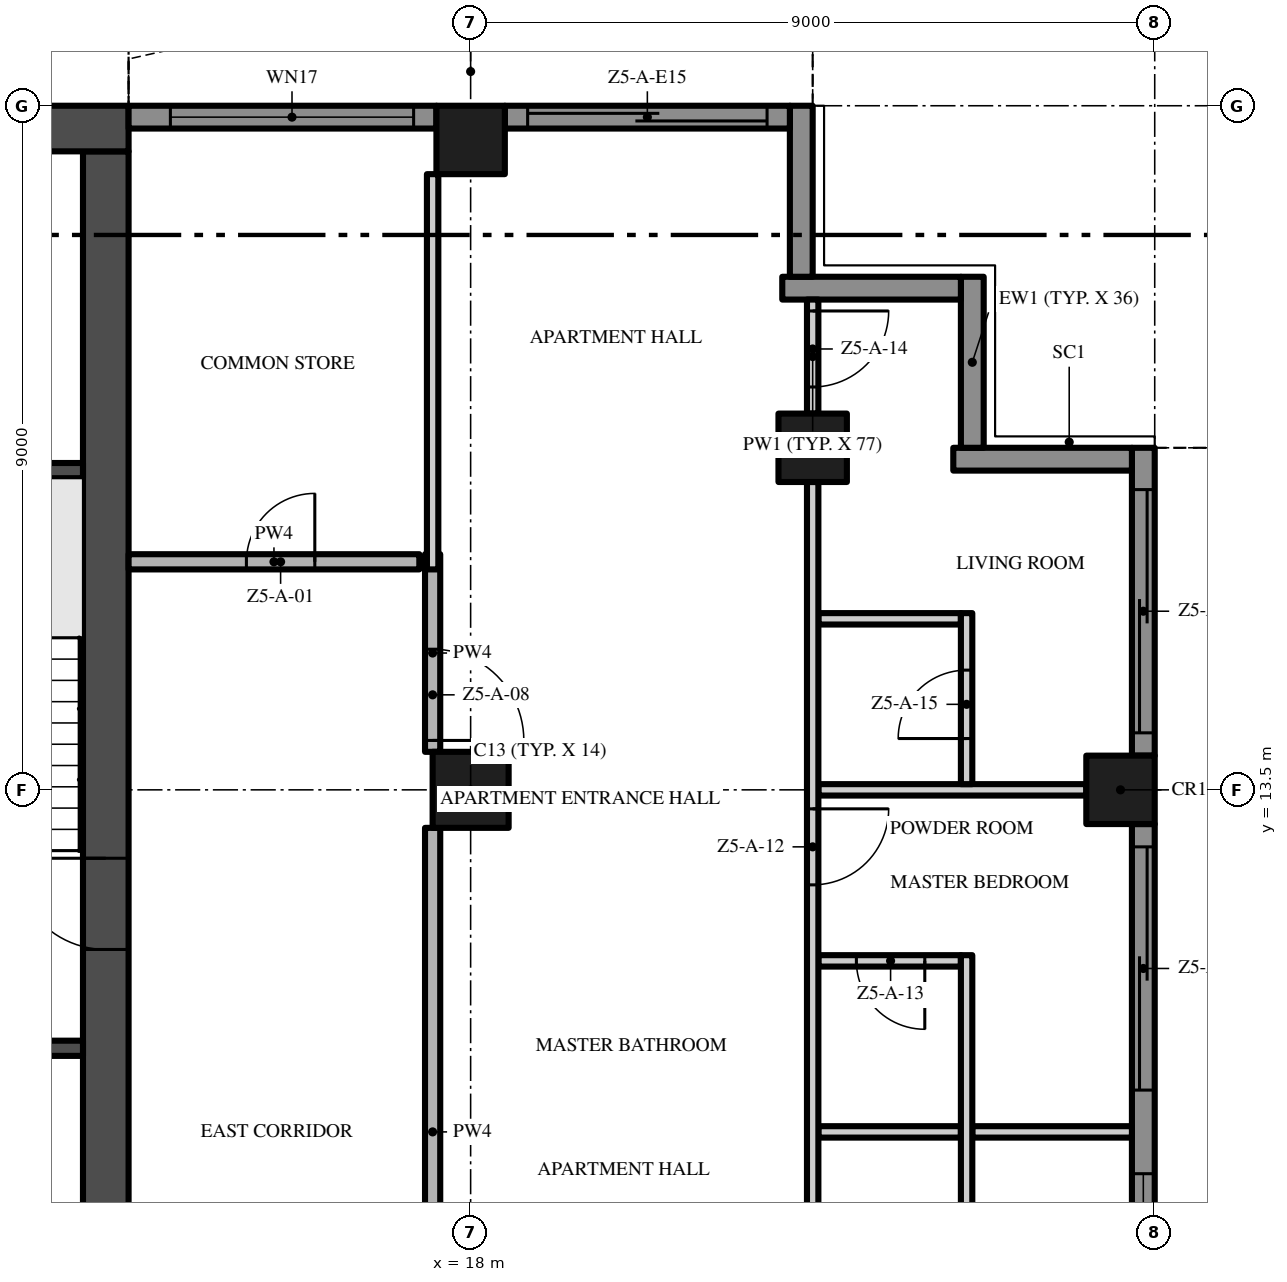
"""IFC4 building model, lengths in metres.
Left out: names, types, materials, properties, quantities, classifications, styles, units other than length and angle.
Written with IfcOpenShell. Run it as: python <this file> out.ifc"""

import sys

from ifc_helpers import new_model, si_unit, direction, frame, frame_2d, origin, origin_2d, place, context, subcontext, project, spatial, polyline, rectangle, outline, extrude, element, fill, save


model = new_model("IFC4")
c1 = context("Model", 3, precision=1e-05, world=origin(), true_north=direction((0.0, 1.0)))
c2 = subcontext(c1, "Body", "Model", "MODEL_VIEW")
j1 = project(units=[si_unit("LENGTHUNIT", "METRE"), si_unit("PLANEANGLEUNIT", "RADIAN")], contexts=[c1])
p1 = place(None, origin())
s1 = spatial("IfcSite", under=j1, at=p1, CompositionType="ELEMENT")
p2 = place(p1, origin())
s2 = spatial("IfcBuilding", under=s1, at=p2, CompositionType="ELEMENT")
p3 = place(p2, frame((0.0, 0.0, 246.4)))
s3 = spatial("IfcBuildingStorey", under=s2, at=p3, CompositionType="ELEMENT", Elevation=246.4)
p4 = place(p3, frame((13.2, 5.1, -0.3), z_axis=(0.0, 0.0, 1.0), x_axis=(0.0, 1.0, 0.0)))
e1 = element("IfcWall", 1, at=p4, inside=s3, PredefinedType="SHEAR", context=c2, shape_type="SweptSolid", body=[
    extrude(rectangle(XDim=16.8, YDim=0.6, at=frame_2d((8.4, 0.0))), origin(), (0.0, 0.0, 1.0), 3.8),
])
p5 = place(p4, frame((6.3, 0.0, 0.3)))
e2 = element("IfcOpeningElement", 2, at=p5, cuts=e1, PredefinedType="OPENING", context=c2, shape_type="SweptSolid", body=[
    extrude(rectangle(XDim=1.2, YDim=2.2, at=frame_2d((0.6, 1.1))), frame((0.0, 0.31, 0.0), z_axis=(0.0, -1.0, 0.0), x_axis=(1.0, 0.0, 0.0)), (0.0, 0.0, 1.0), 0.62),
])
p6 = place(p3, frame((13.5, 22.2, -0.3), z_axis=(0.0, 0.0, 1.0), x_axis=(-1.0, 0.0, 0.0)))
e3 = element("IfcWall", 3, at=p6, inside=s3, PredefinedType="SHEAR", context=c2, shape_type="SweptSolid", body=[
    extrude(rectangle(XDim=27.0, YDim=0.6, at=frame_2d((13.5, 0.0))), origin(), (0.0, 0.0, 1.0), 3.8),
])
p7 = place(p3, frame((18.0, 13.5, 0.0), z_axis=(0.0, 0.0, 1.0), x_axis=(1.0, 0.0, 0.0)))
e4 = element("IfcColumn", 4, at=p7, inside=s3, PredefinedType="COLUMN", context=c2, shape_type="SweptSolid", body=[
    extrude(rectangle(XDim=1.0, YDim=1.0, at=origin_2d()), origin(), (0.0, 0.0, 1.0), 3.5),
])
for number, where, z_axis, x_axis in (
    (5, (18.0, 22.05, 0.0), (0.0, 0.0, 1.0), (1.0, 0.0, 0.0)),
    (6, (26.55, 13.5, 0.0), (0.0, 0.0, 1.0), (1.0, 0.0, 0.0)),
    (7, (22.5, 18.0, 0.0), (0.0, 0.0, 1.0), (1.0, 0.0, 0.0)),
):
    element("IfcColumn", number, at=place(p3, frame(where, z_axis=z_axis, x_axis=x_axis)), inside=s3, PredefinedType="COLUMN", context=c2, shape_type="SweptSolid", body=[
        extrude(rectangle(XDim=0.9, YDim=0.9, at=origin_2d()), origin(), (0.0, 0.0, 1.0), 3.5),
    ])
p8 = place(p3, frame((26.85, 13.05, 0.0), z_axis=(0.0, 0.0, 1.0), x_axis=(0.0, -1.0, 0.0)))
e8 = element("IfcWall", 8, at=p8, inside=s3, PredefinedType="SOLIDWALL", context=c2, shape_type="SweptSolid", body=[
    extrude(rectangle(XDim=8.1, YDim=0.3, at=frame_2d((4.05, 0.0))), origin(), (0.0, 0.0, 1.0), 3.5),
])
p9 = place(p8, frame((4.6, 0.0, 0.45)))
e9 = element("IfcOpeningElement", 9, at=p9, cuts=e8, PredefinedType="OPENING", context=c2, shape_type="SweptSolid", body=[
    extrude(rectangle(XDim=3.2, YDim=2.65, at=frame_2d((1.6, 1.325))), frame((0.0, 0.16, 0.0), z_axis=(0.0, -1.0, 0.0), x_axis=(1.0, 0.0, 0.0)), (0.0, 0.0, 1.0), 0.32),
])
p10 = place(p8, frame((0.3, 0.0, 0.0)))
e10 = element("IfcOpeningElement", 10, at=p10, cuts=e8, PredefinedType="OPENING", context=c2, shape_type="SweptSolid", body=[
    extrude(rectangle(XDim=3.2, YDim=2.4, at=frame_2d((1.6, 1.2))), frame((0.0, 0.16, 0.0), z_axis=(0.0, -1.0, 0.0), x_axis=(1.0, 0.0, 0.0)), (0.0, 0.0, 1.0), 0.32),
])
p11 = place(p3, frame((26.85, 18.0, 0.0), z_axis=(0.0, 0.0, 1.0), x_axis=(0.0, -1.0, 0.0)))
e11 = element("IfcWall", 11, at=p11, inside=s3, PredefinedType="SOLIDWALL", context=c2, shape_type="SweptSolid", body=[
    extrude(rectangle(XDim=4.05, YDim=0.3, at=frame_2d((2.025, 0.0))), origin(), (0.0, 0.0, 1.0), 3.5),
])
p12 = place(p11, frame((0.55, 0.0, 0.0)))
e12 = element("IfcOpeningElement", 12, at=p12, cuts=e11, PredefinedType="OPENING", context=c2, shape_type="SweptSolid", body=[
    extrude(rectangle(XDim=3.2, YDim=2.4, at=frame_2d((1.6, 1.2))), frame((0.0, 0.16, 0.0), z_axis=(0.0, -1.0, 0.0), x_axis=(1.0, 0.0, 0.0)), (0.0, 0.0, 1.0), 0.32),
])
p13 = place(p3, frame((24.35, 17.85, 0.0), z_axis=(0.0, 0.0, 1.0), x_axis=(1.0, 0.0, 0.0)))
e13 = element("IfcWall", 13, at=p13, inside=s3, PredefinedType="SOLIDWALL", context=c2, shape_type="SweptSolid", body=[
    extrude(rectangle(XDim=2.35, YDim=0.3, at=frame_2d((1.175, 0.0))), origin(), (0.0, 0.0, 1.0), 3.5),
])
p14 = place(p3, frame((24.6, 20.25, 0.0), z_axis=(0.0, 0.0, 1.0), x_axis=(0.0, -1.0, 0.0)))
e14 = element("IfcWall", 14, at=p14, inside=s3, PredefinedType="SOLIDWALL", context=c2, shape_type="SweptSolid", body=[
    extrude(rectangle(XDim=2.25, YDim=0.3, at=frame_2d((1.125, 0.0))), origin(), (0.0, 0.0, 1.0), 3.5),
])
p15 = place(p3, frame((22.1, 20.1, 0.0), z_axis=(0.0, 0.0, 1.0), x_axis=(1.0, 0.0, 0.0)))
e15 = element("IfcWall", 15, at=p15, inside=s3, PredefinedType="SOLIDWALL", context=c2, shape_type="SweptSolid", body=[
    extrude(rectangle(XDim=2.35, YDim=0.3, at=frame_2d((1.175, 0.0))), origin(), (0.0, 0.0, 1.0), 3.5),
])
p16 = place(p3, frame((22.35, 22.5, 0.0), z_axis=(0.0, 0.0, 1.0), x_axis=(0.0, -1.0, 0.0)))
e16 = element("IfcWall", 16, at=p16, inside=s3, PredefinedType="SOLIDWALL", context=c2, shape_type="SweptSolid", body=[
    extrude(rectangle(XDim=2.25, YDim=0.3, at=frame_2d((1.125, 0.0))), origin(), (0.0, 0.0, 1.0), 3.5),
])
p17 = place(p3, frame((18.45, 22.35, 0.0), z_axis=(0.0, 0.0, 1.0), x_axis=(1.0, 0.0, 0.0)))
e17 = element("IfcWall", 17, at=p17, inside=s3, PredefinedType="SOLIDWALL", context=c2, shape_type="SweptSolid", body=[
    extrude(rectangle(XDim=3.75, YDim=0.3, at=frame_2d((1.875, 0.0))), origin(), (0.0, 0.0, 1.0), 3.5),
])
p18 = place(p17, frame((0.3, 0.0, 0.0)))
e18 = element("IfcOpeningElement", 18, at=p18, cuts=e17, PredefinedType="OPENING", context=c2, shape_type="SweptSolid", body=[
    extrude(rectangle(XDim=3.15, YDim=2.4, at=frame_2d((1.575, 1.2))), frame((0.0, 0.16, 0.0), z_axis=(0.0, -1.0, 0.0), x_axis=(1.0, 0.0, 0.0)), (0.0, 0.0, 1.0), 0.32),
])
p19 = place(p3, frame((13.5, 22.35, 0.0), z_axis=(0.0, 0.0, 1.0), x_axis=(1.0, 0.0, 0.0)))
e19 = element("IfcWall", 19, at=p19, inside=s3, PredefinedType="SOLIDWALL", context=c2, shape_type="SweptSolid", body=[
    extrude(rectangle(XDim=4.05, YDim=0.3, at=frame_2d((2.025, 0.0))), origin(), (0.0, 0.0, 1.0), 3.5),
])
p20 = place(p19, frame((0.55, 0.0, 0.45)))
e20 = element("IfcOpeningElement", 20, at=p20, cuts=e19, PredefinedType="OPENING", context=c2, shape_type="SweptSolid", body=[
    extrude(rectangle(XDim=3.2, YDim=2.65, at=frame_2d((1.6, 1.325))), frame((0.0, 0.16, 0.0), z_axis=(0.0, -1.0, 0.0), x_axis=(1.0, 0.0, 0.0)), (0.0, 0.0, 1.0), 0.32),
])
p21 = place(p3, origin())
e21 = element("IfcWall", 21, at=p21, inside=s3, PredefinedType="USERDEFINED", context=c2, shape_type="SweptSolid", body=[
    extrude(outline(polyline([(29.649, -18.0), (29.985, -16.5), (30.0, -16.125), (29.869, -15.0), (29.345, -13.5), (28.612, -12.0), (27.951, -10.5), (27.615, -9.0), (27.6, -8.625), (27.731, -7.5), (28.255, -6.0), (28.988, -4.5), (29.649, -3.0), (29.985, -1.5), (30.0, -1.125), (29.869, 0.0), (29.345, 1.5), (28.612, 3.0), (27.951, 4.5), (27.615, 6.0), (27.6, 6.375), (27.731, 7.5), (28.255, 9.0), (28.988, 10.5), (29.649, 12.0), (29.985, 13.5), (30.0, 13.875), (29.869, 15.0), (29.345, 16.5), (28.612, 18.0), (28.388, 17.89), (29.114, 16.404), (29.624, 14.944), (29.749, 13.865), (29.736, 13.533), (29.41, 12.079), (28.761, 10.605), (28.024, 9.096), (27.486, 7.556), (27.349, 6.385), (27.366, 5.967), (27.713, 4.421), (28.385, 2.895), (29.114, 1.404), (29.624, -0.056), (29.749, -1.135), (29.736, -1.467), (29.41, -2.921), (28.761, -4.395), (28.024, -5.904), (27.486, -7.444), (27.349, -8.615), (27.366, -9.033), (27.713, -10.579), (28.385, -12.105), (29.114, -13.596), (29.624, -15.056), (29.749, -16.135), (29.736, -16.467), (29.405, -17.945), (29.649, -18.0)])), origin(), (0.0, 0.0, 1.0), 0.9),
])
p22 = place(p3, origin())
e22 = element("IfcWall", 22, at=p22, inside=s3, PredefinedType="USERDEFINED", context=c2, shape_type="SweptSolid", body=[
    extrude(outline(polyline([(22.5, 25.149), (21.0, 25.485), (20.625, 25.5), (19.5, 25.369), (18.0, 24.845), (16.5, 24.112), (15.0, 23.451), (13.5, 23.115), (13.555, 22.871), (15.079, 23.213), (16.605, 23.885), (18.096, 24.614), (19.556, 25.124), (20.635, 25.249), (20.967, 25.236), (22.445, 24.905), (22.5, 25.149)])), origin(), (0.0, 0.0, 1.0), 0.9),
])
for number, where, z_axis, x_axis in (
    (23, (9.65, 10.1, 0.0), (0.0, 0.0, 1.0), (1.0, 0.0, 0.0)),
    (24, (9.65, 17.7, 0.0), (0.0, 0.0, 1.0), (1.0, 0.0, 0.0)),
):
    element("IfcWall", number, at=place(p3, frame(where, z_axis=z_axis, x_axis=x_axis)), inside=s3, PredefinedType="SHEAR", context=c2, shape_type="SweptSolid", body=[
        extrude(rectangle(XDim=3.25, YDim=0.2, at=frame_2d((1.625, 0.0))), origin(), (0.0, 0.0, 1.0), 3.5),
    ])
p23 = place(p3, frame((22.575, 9.0, 0.0), z_axis=(0.0, 0.0, 1.0), x_axis=(1.0, 0.0, 0.0)))
e25 = element("IfcWall", 25, at=p23, inside=s3, PredefinedType="PARTITIONING", context=c2, shape_type="SweptSolid", body=[
    extrude(rectangle(XDim=1.875, YDim=0.15, at=frame_2d((0.938, 0.0))), origin(), (0.0, 0.0, 1.0), 3.5),
])
p24 = place(p3, frame((24.6, 9.0, 0.0), z_axis=(0.0, 0.0, 1.0), x_axis=(1.0, 0.0, 0.0)))
e26 = element("IfcWall", 26, at=p24, inside=s3, PredefinedType="PARTITIONING", context=c2, shape_type="SweptSolid", body=[
    extrude(rectangle(XDim=2.1, YDim=0.15, at=frame_2d((1.05, 0.0))), origin(), (0.0, 0.0, 1.0), 3.5),
])
p25 = place(p3, frame((24.45, 11.25, 0.0), z_axis=(0.0, 0.0, 1.0), x_axis=(-1.0, 0.0, 0.0)))
e27 = element("IfcWall", 27, at=p25, inside=s3, PredefinedType="PARTITIONING", context=c2, shape_type="SweptSolid", body=[
    extrude(rectangle(XDim=1.875, YDim=0.15, at=frame_2d((0.938, 0.0))), origin(), (0.0, 0.0, 1.0), 3.5),
])
p26 = place(p25, frame((0.475, 0.0, 0.0)))
e28 = element("IfcOpeningElement", 28, at=p26, cuts=e27, PredefinedType="OPENING", context=c2, shape_type="SweptSolid", body=[
    extrude(rectangle(XDim=0.9, YDim=2.1, at=frame_2d((0.45, 1.05))), frame((0.0, 0.085, 0.0), z_axis=(0.0, -1.0, 0.0), x_axis=(1.0, 0.0, 0.0)), (0.0, 0.0, 1.0), 0.17),
])
p27 = place(p3, frame((22.575, 13.5, 0.0), z_axis=(0.0, 0.0, 1.0), x_axis=(1.0, 0.0, 0.0)))
e29 = element("IfcWall", 29, at=p27, inside=s3, PredefinedType="PARTITIONING", context=c2, shape_type="SweptSolid", body=[
    extrude(rectangle(XDim=3.525, YDim=0.15, at=frame_2d((1.762, 0.0))), origin(), (0.0, 0.0, 1.0), 3.5),
])
p28 = place(p3, frame((22.575, 15.75, 0.0), z_axis=(0.0, 0.0, 1.0), x_axis=(1.0, 0.0, 0.0)))
e30 = element("IfcWall", 30, at=p28, inside=s3, PredefinedType="PARTITIONING", context=c2, shape_type="SweptSolid", body=[
    extrude(rectangle(XDim=1.875, YDim=0.15, at=frame_2d((0.938, 0.0))), origin(), (0.0, 0.0, 1.0), 3.5),
])
p29 = place(p3, frame((13.5, 16.5, 0.0), z_axis=(0.0, 0.0, 1.0), x_axis=(1.0, 0.0, 0.0)))
e31 = element("IfcWall", 31, at=p29, inside=s3, PredefinedType="PARTITIONING", context=c2, shape_type="SweptSolid", body=[
    extrude(rectangle(XDim=3.825, YDim=0.2, at=frame_2d((1.913, 0.0))), origin(), (0.0, 0.0, 1.0), 3.5),
])
p30 = place(p29, frame((1.55, 0.0, 0.0)))
e32 = element("IfcOpeningElement", 32, at=p30, cuts=e31, PredefinedType="OPENING", context=c2, shape_type="SweptSolid", body=[
    extrude(rectangle(XDim=0.9, YDim=2.1, at=frame_2d((0.45, 1.05))), frame((0.0, 0.11, 0.0), z_axis=(0.0, -1.0, 0.0), x_axis=(1.0, 0.0, 0.0)), (0.0, 0.0, 1.0), 0.22),
])
p31 = place(p3, frame((17.5, 5.0, 0.0), z_axis=(0.0, 0.0, 1.0), x_axis=(0.0, 1.0, 0.0)))
e33 = element("IfcWall", 33, at=p31, inside=s3, PredefinedType="PARTITIONING", context=c2, shape_type="SweptSolid", body=[
    extrude(rectangle(XDim=8.0, YDim=0.2, at=frame_2d((4.0, 0.0))), origin(), (0.0, 0.0, 1.0), 3.5),
])
p32 = place(p3, frame((17.5, 16.6, 0.0), z_axis=(0.0, 0.0, 1.0), x_axis=(0.0, -1.0, 0.0)))
e34 = element("IfcWall", 34, at=p32, inside=s3, PredefinedType="PARTITIONING", context=c2, shape_type="SweptSolid", body=[
    extrude(rectangle(XDim=2.6, YDim=0.2, at=frame_2d((1.3, 0.0))), origin(), (0.0, 0.0, 1.0), 3.5),
])
p33 = place(p32, frame((1.25, 0.0, 0.0)))
e35 = element("IfcOpeningElement", 35, at=p33, cuts=e34, PredefinedType="OPENING", context=c2, shape_type="SweptSolid", body=[
    extrude(rectangle(XDim=1.2, YDim=2.4, at=frame_2d((0.6, 1.2))), frame((0.0, 0.11, 0.0), z_axis=(0.0, -1.0, 0.0), x_axis=(1.0, 0.0, 0.0)), (0.0, 0.0, 1.0), 0.22),
])
p34 = place(p3, frame((17.5, 16.4, 0.0), z_axis=(0.0, 0.0, 1.0), x_axis=(0.0, 1.0, 0.0)))
e36 = element("IfcWall", 36, at=p34, inside=s3, PredefinedType="PARTITIONING", context=c2, shape_type="SweptSolid", body=[
    extrude(rectangle(XDim=5.2, YDim=0.15, at=frame_2d((2.6, 0.0))), origin(), (0.0, 0.0, 1.0), 3.5),
])
p35 = place(p3, frame((22.5, 17.55, 0.0), z_axis=(0.0, 0.0, 1.0), x_axis=(0.0, -1.0, 0.0)))
e37 = element("IfcWall", 37, at=p35, inside=s3, PredefinedType="PARTITIONING", context=c2, shape_type="SweptSolid", body=[
    extrude(rectangle(XDim=17.45, YDim=0.15, at=frame_2d((8.725, 0.0))), origin(), (0.0, 0.0, 1.0), 3.5),
])
p36 = place(p35, frame((14.8, 0.0, 0.0)))
e38 = element("IfcOpeningElement", 38, at=p36, cuts=e37, PredefinedType="OPENING", context=c2, shape_type="SweptSolid", body=[
    extrude(rectangle(XDim=1.0, YDim=2.4, at=frame_2d((0.5, 1.2))), frame((0.0, 0.085, 0.0), z_axis=(0.0, -1.0, 0.0), x_axis=(1.0, 0.0, 0.0)), (0.0, 0.0, 1.0), 0.17),
])
p37 = place(p35, frame((11.45, 0.0, 0.0)))
e39 = element("IfcOpeningElement", 39, at=p37, cuts=e37, PredefinedType="OPENING", context=c2, shape_type="SweptSolid", body=[
    extrude(rectangle(XDim=1.0, YDim=2.4, at=frame_2d((0.5, 1.2))), frame((0.0, 0.085, 0.0), z_axis=(0.0, -1.0, 0.0), x_axis=(1.0, 0.0, 0.0)), (0.0, 0.0, 1.0), 0.17),
])
p38 = place(p35, frame((4.3, 0.0, 0.0)))
e40 = element("IfcOpeningElement", 40, at=p38, cuts=e37, PredefinedType="OPENING", context=c2, shape_type="SweptSolid", body=[
    extrude(rectangle(XDim=1.0, YDim=2.4, at=frame_2d((0.5, 1.2))), frame((0.0, 0.085, 0.0), z_axis=(0.0, -1.0, 0.0), x_axis=(1.0, 0.0, 0.0)), (0.0, 0.0, 1.0), 0.17),
])
p39 = place(p3, frame((22.5, 19.95, 0.0), z_axis=(0.0, 0.0, 1.0), x_axis=(0.0, -1.0, 0.0)))
e41 = element("IfcWall", 41, at=p39, inside=s3, PredefinedType="PARTITIONING", context=c2, shape_type="SweptSolid", body=[
    extrude(rectangle(XDim=1.5, YDim=0.15, at=frame_2d((0.75, 0.0))), origin(), (0.0, 0.0, 1.0), 3.5),
])
p40 = place(p39, frame((0.15, 0.0, 0.0)))
e42 = element("IfcOpeningElement", 42, at=p40, cuts=e41, PredefinedType="OPENING", context=c2, shape_type="SweptSolid", body=[
    extrude(rectangle(XDim=1.0, YDim=2.4, at=frame_2d((0.5, 1.2))), frame((0.0, 0.085, 0.0), z_axis=(0.0, -1.0, 0.0), x_axis=(1.0, 0.0, 0.0)), (0.0, 0.0, 1.0), 0.17),
])
p41 = place(p3, frame((24.525, 6.675, 0.0), z_axis=(0.0, 0.0, 1.0), x_axis=(0.0, 1.0, 0.0)))
e43 = element("IfcWall", 43, at=p41, inside=s3, PredefinedType="PARTITIONING", context=c2, shape_type="SweptSolid", body=[
    extrude(rectangle(XDim=4.65, YDim=0.15, at=frame_2d((2.325, 0.0))), origin(), (0.0, 0.0, 1.0), 3.5),
])
p42 = place(p3, frame((24.525, 13.575, 0.0), z_axis=(0.0, 0.0, 1.0), x_axis=(0.0, 1.0, 0.0)))
e44 = element("IfcWall", 44, at=p42, inside=s3, PredefinedType="PARTITIONING", context=c2, shape_type="SweptSolid", body=[
    extrude(rectangle(XDim=2.25, YDim=0.15, at=frame_2d((1.125, 0.0))), origin(), (0.0, 0.0, 1.0), 3.5),
])
p43 = place(p42, frame((0.6, 0.0, 0.0)))
e45 = element("IfcOpeningElement", 45, at=p43, cuts=e44, PredefinedType="OPENING", context=c2, shape_type="SweptSolid", body=[
    extrude(rectangle(XDim=0.9, YDim=2.1, at=frame_2d((0.45, 1.05))), frame((0.0, 0.085, 0.0), z_axis=(0.0, -1.0, 0.0), x_axis=(1.0, 0.0, 0.0)), (0.0, 0.0, 1.0), 0.17),
])
p44 = place(p9, origin())
e46 = element("IfcWindow", 46, at=p44, inside=s3, PartitioningType="SINGLE_PANEL", PredefinedType="WINDOW", context=c2, shape_type="SweptSolid", body=[
    extrude(rectangle(XDim=3.2, YDim=2.65, at=frame_2d((1.6, 1.325))), frame((0.0, 0.03, 0.0), z_axis=(0.0, -1.0, 0.0), x_axis=(1.0, 0.0, 0.0)), (0.0, 0.0, 1.0), 0.06),
])
fill(e9, e46)
p45 = place(p10, origin())
e47 = element("IfcDoor", 47, at=p45, inside=s3, OperationType="SINGLE_SWING_LEFT", PredefinedType="DOOR", context=c2, shape_type="SweptSolid", body=[
    extrude(rectangle(XDim=3.2, YDim=2.4, at=frame_2d((1.6, 1.2))), frame((0.0, 0.025, 0.0), z_axis=(0.0, -1.0, 0.0), x_axis=(1.0, 0.0, 0.0)), (0.0, 0.0, 1.0), 0.05),
])
fill(e10, e47)
p46 = place(p12, origin())
e48 = element("IfcDoor", 48, at=p46, inside=s3, OperationType="SINGLE_SWING_LEFT", PredefinedType="DOOR", context=c2, shape_type="SweptSolid", body=[
    extrude(rectangle(XDim=3.2, YDim=2.4, at=frame_2d((1.6, 1.2))), frame((0.0, 0.025, 0.0), z_axis=(0.0, -1.0, 0.0), x_axis=(1.0, 0.0, 0.0)), (0.0, 0.0, 1.0), 0.05),
])
fill(e12, e48)
p47 = place(p18, origin())
e49 = element("IfcDoor", 49, at=p47, inside=s3, OperationType="SINGLE_SWING_LEFT", PredefinedType="DOOR", context=c2, shape_type="SweptSolid", body=[
    extrude(rectangle(XDim=3.15, YDim=2.4, at=frame_2d((1.575, 1.2))), frame((0.0, 0.025, 0.0), z_axis=(0.0, -1.0, 0.0), x_axis=(1.0, 0.0, 0.0)), (0.0, 0.0, 1.0), 0.05),
])
fill(e18, e49)
p48 = place(p20, origin())
e50 = element("IfcWindow", 50, at=p48, inside=s3, PartitioningType="SINGLE_PANEL", PredefinedType="WINDOW", context=c2, shape_type="SweptSolid", body=[
    extrude(rectangle(XDim=3.2, YDim=2.65, at=frame_2d((1.6, 1.325))), frame((0.0, 0.03, 0.0), z_axis=(0.0, -1.0, 0.0), x_axis=(1.0, 0.0, 0.0)), (0.0, 0.0, 1.0), 0.06),
])
fill(e20, e50)
p49 = place(p5, frame((1.2, 0.0, 0.0), z_axis=(0.0, 0.0, 1.0), x_axis=(-1.0, 0.0, 0.0)))
e51 = element("IfcDoor", 51, at=p49, inside=s3, OperationType="SINGLE_SWING_LEFT", PredefinedType="DOOR", context=c2, shape_type="SweptSolid", body=[
    extrude(rectangle(XDim=1.2, YDim=2.2, at=frame_2d((0.6, 1.1))), frame((0.0, 0.025, 0.0), z_axis=(0.0, -1.0, 0.0), x_axis=(1.0, 0.0, 0.0)), (0.0, 0.0, 1.0), 0.05),
])
fill(e2, e51)
p50 = place(p30, origin())
e52 = element("IfcDoor", 52, at=p50, inside=s3, OperationType="SINGLE_SWING_RIGHT", PredefinedType="DOOR", context=c2, shape_type="SweptSolid", body=[
    extrude(rectangle(XDim=0.9, YDim=2.1, at=frame_2d((0.45, 1.05))), frame((0.0, 0.025, 0.0), z_axis=(0.0, -1.0, 0.0), x_axis=(1.0, 0.0, 0.0)), (0.0, 0.0, 1.0), 0.05),
])
fill(e32, e52)
p51 = place(p33, origin())
e53 = element("IfcDoor", 53, at=p51, inside=s3, OperationType="SINGLE_SWING_RIGHT", PredefinedType="DOOR", context=c2, shape_type="SweptSolid", body=[
    extrude(rectangle(XDim=1.2, YDim=2.4, at=frame_2d((0.6, 1.2))), frame((0.0, 0.025, 0.0), z_axis=(0.0, -1.0, 0.0), x_axis=(1.0, 0.0, 0.0)), (0.0, 0.0, 1.0), 0.05),
])
fill(e35, e53)
p52 = place(p38, origin())
e54 = element("IfcDoor", 54, at=p52, inside=s3, OperationType="SINGLE_SWING_LEFT", PredefinedType="DOOR", context=c2, shape_type="SweptSolid", body=[
    extrude(rectangle(XDim=1.0, YDim=2.4, at=frame_2d((0.5, 1.2))), frame((0.0, 0.025, 0.0), z_axis=(0.0, -1.0, 0.0), x_axis=(1.0, 0.0, 0.0)), (0.0, 0.0, 1.0), 0.05),
])
fill(e40, e54)
p53 = place(p26, origin())
e55 = element("IfcDoor", 55, at=p53, inside=s3, OperationType="SINGLE_SWING_LEFT", PredefinedType="DOOR", context=c2, shape_type="SweptSolid", body=[
    extrude(rectangle(XDim=0.9, YDim=2.1, at=frame_2d((0.45, 1.05))), frame((0.0, 0.025, 0.0), z_axis=(0.0, -1.0, 0.0), x_axis=(1.0, 0.0, 0.0)), (0.0, 0.0, 1.0), 0.05),
])
fill(e28, e55)
p54 = place(p40, origin())
e56 = element("IfcDoor", 56, at=p54, inside=s3, OperationType="SINGLE_SWING_LEFT", PredefinedType="DOOR", context=c2, shape_type="SweptSolid", body=[
    extrude(rectangle(XDim=1.0, YDim=2.4, at=frame_2d((0.5, 1.2))), frame((0.0, 0.025, 0.0), z_axis=(0.0, -1.0, 0.0), x_axis=(1.0, 0.0, 0.0)), (0.0, 0.0, 1.0), 0.05),
])
fill(e42, e56)
p55 = place(p43, origin())
e57 = element("IfcDoor", 57, at=p55, inside=s3, OperationType="SINGLE_SWING_LEFT", PredefinedType="DOOR", context=c2, shape_type="SweptSolid", body=[
    extrude(rectangle(XDim=0.9, YDim=2.1, at=frame_2d((0.45, 1.05))), frame((0.0, 0.025, 0.0), z_axis=(0.0, -1.0, 0.0), x_axis=(1.0, 0.0, 0.0)), (0.0, 0.0, 1.0), 0.05),
])
fill(e45, e57)
save(model, sys.argv[1])
